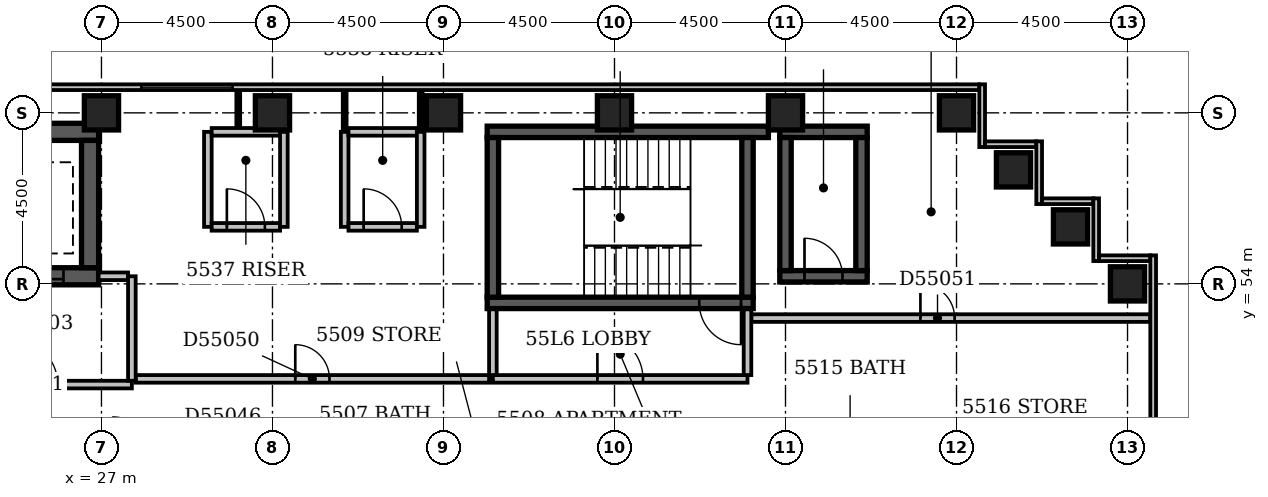
"""IFC4 building model, lengths in metres.
Left out: names, types, materials, properties, quantities, classifications, styles, units other than length and angle.
Written with IfcOpenShell. Run it as: python <this file> out.ifc"""

import sys

from ifc_helpers import new_model, si_unit, direction, frame, frame_2d, origin, origin_2d, place, context, subcontext, project, spatial, rectangle, extrude, element, fill, save


model = new_model("IFC4")
c1 = context("Model", 3, precision=1e-05, world=origin(), true_north=direction((0.0, 1.0)))
c2 = subcontext(c1, "Body", "Model", "MODEL_VIEW")
j1 = project(units=[si_unit("LENGTHUNIT", "METRE"), si_unit("PLANEANGLEUNIT", "RADIAN")], contexts=[c1])
p1 = place(None, origin())
s1 = spatial("IfcSite", under=j1, at=p1, CompositionType="ELEMENT")
p2 = place(p1, origin())
s2 = spatial("IfcBuilding", under=s1, at=p2, CompositionType="ELEMENT")
p3 = place(p2, frame((0.0, 0.0, 215.0)))
s3 = spatial("IfcBuildingStorey", under=s2, at=p3, CompositionType="ELEMENT", Elevation=215.0)
p4 = place(p3, frame((23.975, 54.2, -0.3), z_axis=(0.0, 0.0, 1.0), x_axis=(1.0, 0.0, 0.0)))
e1 = element("IfcWall", 1, at=p4, inside=s3, PredefinedType="SHEAR", context=c2, shape_type="SweptSolid", body=[
    extrude(rectangle(XDim=2.95, YDim=0.45, at=frame_2d((1.475, 0.0))), origin(), (0.0, 0.0, 1.0), 3.6),
])
p5 = place(p4, frame((0.925, 0.0, 0.3)))
e2 = element("IfcOpeningElement", 2, at=p5, cuts=e1, PredefinedType="OPENING", context=c2, shape_type="SweptSolid", body=[
    extrude(rectangle(XDim=1.1, YDim=2.1, at=frame_2d((0.55, 1.05))), frame((0.0, 0.237, 0.0), z_axis=(0.0, -1.0, 0.0), x_axis=(1.0, 0.0, 0.0)), (0.0, 0.0, 1.0), 0.474),
])
p6 = place(p3, frame((23.975, 58.0, -0.3), z_axis=(0.0, 0.0, 1.0), x_axis=(1.0, 0.0, 0.0)))
e3 = element("IfcWall", 3, at=p6, inside=s3, PredefinedType="SHEAR", context=c2, shape_type="SweptSolid", body=[
    extrude(rectangle(XDim=2.95, YDim=0.45, at=frame_2d((1.475, 0.0))), origin(), (0.0, 0.0, 1.0), 3.6),
])
p7 = place(p3, frame((26.7, 54.425, -0.3), z_axis=(0.0, 0.0, 1.0), x_axis=(0.0, 1.0, 0.0)))
e4 = element("IfcWall", 4, at=p7, inside=s3, PredefinedType="SHEAR", context=c2, shape_type="SweptSolid", body=[
    extrude(rectangle(XDim=3.35, YDim=0.45, at=frame_2d((1.675, 0.0))), origin(), (0.0, 0.0, 1.0), 3.6),
])
p8 = place(p3, frame((37.15, 53.5, -0.3), z_axis=(0.0, 0.0, 1.0), x_axis=(1.0, 0.0, 0.0)))
e5 = element("IfcWall", 5, at=p8, inside=s3, PredefinedType="SHEAR", context=c2, shape_type="SweptSolid", body=[
    extrude(rectangle(XDim=7.0, YDim=0.3, at=frame_2d((3.5, 0.0))), origin(), (0.0, 0.0, 1.0), 3.6),
])
p9 = place(p8, frame((5.58, 0.0, 0.3)))
e6 = element("IfcOpeningElement", 6, at=p9, cuts=e5, PredefinedType="OPENING", context=c2, shape_type="SweptSolid", body=[
    extrude(rectangle(XDim=1.1, YDim=2.1, at=frame_2d((0.55, 1.05))), frame((0.0, 0.162, 0.0), z_axis=(0.0, -1.0, 0.0), x_axis=(1.0, 0.0, 0.0)), (0.0, 0.0, 1.0), 0.324),
])
p10 = place(p3, frame((37.15, 58.0, -0.3), z_axis=(0.0, 0.0, 1.0), x_axis=(1.0, 0.0, 0.0)))
e7 = element("IfcWall", 7, at=p10, inside=s3, PredefinedType="SHEAR", context=c2, shape_type="SweptSolid", body=[
    extrude(rectangle(XDim=7.4, YDim=0.3, at=frame_2d((3.7, 0.0))), origin(), (0.0, 0.0, 1.0), 3.6),
])
for number, where, z_axis, x_axis in (
    (8, (37.3, 53.65, -0.3), (0.0, 0.0, 1.0), (0.0, 1.0, 0.0)),
    (9, (44.0, 53.65, -0.3), (0.0, 0.0, 1.0), (0.0, 1.0, 0.0)),
):
    element("IfcWall", number, at=place(p3, frame(where, z_axis=z_axis, x_axis=x_axis)), inside=s3, PredefinedType="SHEAR", context=c2, shape_type="SweptSolid", body=[
        extrude(rectangle(XDim=4.2, YDim=0.3, at=frame_2d((2.1, 0.0))), origin(), (0.0, 0.0, 1.0), 3.6),
    ])
p11 = place(p3, frame((44.85, 54.2, -0.3), z_axis=(0.0, 0.0, 1.0), x_axis=(1.0, 0.0, 0.0)))
e10 = element("IfcWall", 10, at=p11, inside=s3, PredefinedType="SHEAR", context=c2, shape_type="SweptSolid", body=[
    extrude(rectangle(XDim=2.3, YDim=0.3, at=frame_2d((1.15, 0.0))), origin(), (0.0, 0.0, 1.0), 3.6),
])
p12 = place(p11, frame((0.65, 0.0, 0.3)))
e11 = element("IfcOpeningElement", 11, at=p12, cuts=e10, PredefinedType="OPENING", context=c2, shape_type="SweptSolid", body=[
    extrude(rectangle(XDim=1.0, YDim=2.1, at=frame_2d((0.5, 1.05))), frame((0.0, 0.162, 0.0), z_axis=(0.0, -1.0, 0.0), x_axis=(1.0, 0.0, 0.0)), (0.0, 0.0, 1.0), 0.324),
])
p13 = place(p3, frame((44.85, 58.0, -0.3), z_axis=(0.0, 0.0, 1.0), x_axis=(1.0, 0.0, 0.0)))
e12 = element("IfcWall", 12, at=p13, inside=s3, PredefinedType="SHEAR", context=c2, shape_type="SweptSolid", body=[
    extrude(rectangle(XDim=2.3, YDim=0.3, at=frame_2d((1.15, 0.0))), origin(), (0.0, 0.0, 1.0), 3.6),
])
for number, where, z_axis, x_axis in (
    (13, (45.0, 54.35, -0.3), (0.0, 0.0, 1.0), (0.0, 1.0, 0.0)),
    (14, (47.0, 54.35, -0.3), (0.0, 0.0, 1.0), (0.0, 1.0, 0.0)),
):
    element("IfcWall", number, at=place(p3, frame(where, z_axis=z_axis, x_axis=x_axis)), inside=s3, PredefinedType="SHEAR", context=c2, shape_type="SweptSolid", body=[
        extrude(rectangle(XDim=3.5, YDim=0.3, at=frame_2d((1.75, 0.0))), origin(), (0.0, 0.0, 1.0), 3.6),
    ])
for number, where, z_axis, x_axis in (
    (15, (54.0, 54.0, -0.3), (0.0, 0.0, 1.0), (1.0, 0.0, 0.0)),
    (16, (52.5, 55.5, -0.3), (0.0, 0.0, 1.0), (1.0, 0.0, 0.0)),
    (17, (51.0, 57.0, -0.3), (0.0, 0.0, 1.0), (1.0, 0.0, 0.0)),
    (18, (27.0, 58.5, -0.3), (0.0, 0.0, 1.0), (1.0, 0.0, 0.0)),
    (19, (31.5, 58.5, -0.3), (0.0, 0.0, 1.0), (1.0, 0.0, 0.0)),
    (20, (36.0, 58.5, -0.3), (0.0, 0.0, 1.0), (1.0, 0.0, 0.0)),
    (21, (40.5, 58.5, -0.3), (0.0, 0.0, 1.0), (1.0, 0.0, 0.0)),
    (22, (45.0, 58.5, -0.3), (0.0, 0.0, 1.0), (1.0, 0.0, 0.0)),
    (23, (49.5, 58.5, -0.3), (0.0, 0.0, 1.0), (1.0, 0.0, 0.0)),
):
    element("IfcColumn", number, at=place(p3, frame(where, z_axis=z_axis, x_axis=x_axis)), inside=s3, PredefinedType="COLUMN", context=c2, shape_type="SweptSolid", body=[
        extrude(rectangle(XDim=0.9, YDim=0.9, at=origin_2d()), origin(), (0.0, 0.0, 1.0), 3.6),
    ])
p14 = place(p3, frame((54.675, 39.9, 0.0), z_axis=(0.0, 0.0, 1.0), x_axis=(0.0, 1.0, 0.0)))
e24 = element("IfcWall", 24, at=p14, inside=s3, PredefinedType="STANDARD", context=c2, shape_type="SweptSolid", body=[
    extrude(rectangle(XDim=14.85, YDim=0.15, at=frame_2d((7.425, 0.0))), origin(), (0.0, 0.0, 1.0), 2.7),
])
p15 = place(p3, frame((54.6, 54.675, 0.0), z_axis=(0.0, 0.0, 1.0), x_axis=(-1.0, 0.0, 0.0)))
e25 = element("IfcWall", 25, at=p15, inside=s3, PredefinedType="STANDARD", context=c2, shape_type="SweptSolid", body=[
    extrude(rectangle(XDim=1.35, YDim=0.15, at=frame_2d((0.675, 0.0))), origin(), (0.0, 0.0, 1.0), 2.7),
])
p16 = place(p3, frame((53.175, 54.6, 0.0), z_axis=(0.0, 0.0, 1.0), x_axis=(0.0, 1.0, 0.0)))
e26 = element("IfcWall", 26, at=p16, inside=s3, PredefinedType="STANDARD", context=c2, shape_type="SweptSolid", body=[
    extrude(rectangle(XDim=1.65, YDim=0.15, at=frame_2d((0.825, 0.0))), origin(), (0.0, 0.0, 1.0), 2.7),
])
p17 = place(p3, frame((53.1, 56.175, 0.0), z_axis=(0.0, 0.0, 1.0), x_axis=(-1.0, 0.0, 0.0)))
e27 = element("IfcWall", 27, at=p17, inside=s3, PredefinedType="STANDARD", context=c2, shape_type="SweptSolid", body=[
    extrude(rectangle(XDim=1.35, YDim=0.15, at=frame_2d((0.675, 0.0))), origin(), (0.0, 0.0, 1.0), 2.7),
])
p18 = place(p3, frame((51.675, 56.1, 0.0), z_axis=(0.0, 0.0, 1.0), x_axis=(0.0, 1.0, 0.0)))
e28 = element("IfcWall", 28, at=p18, inside=s3, PredefinedType="STANDARD", context=c2, shape_type="SweptSolid", body=[
    extrude(rectangle(XDim=1.65, YDim=0.15, at=frame_2d((0.825, 0.0))), origin(), (0.0, 0.0, 1.0), 2.7),
])
p19 = place(p3, frame((51.6, 57.675, 0.0), z_axis=(0.0, 0.0, 1.0), x_axis=(-1.0, 0.0, 0.0)))
e29 = element("IfcWall", 29, at=p19, inside=s3, PredefinedType="STANDARD", context=c2, shape_type="SweptSolid", body=[
    extrude(rectangle(XDim=1.35, YDim=0.15, at=frame_2d((0.675, 0.0))), origin(), (0.0, 0.0, 1.0), 2.7),
])
p20 = place(p3, frame((50.175, 57.6, 0.0), z_axis=(0.0, 0.0, 1.0), x_axis=(0.0, 1.0, 0.0)))
e30 = element("IfcWall", 30, at=p20, inside=s3, PredefinedType="STANDARD", context=c2, shape_type="SweptSolid", body=[
    extrude(rectangle(XDim=1.65, YDim=0.15, at=frame_2d((0.825, 0.0))), origin(), (0.0, 0.0, 1.0), 2.7),
])
p21 = place(p3, frame((50.1, 59.175, 0.0), z_axis=(0.0, 0.0, 1.0), x_axis=(-1.0, 0.0, 0.0)))
e31 = element("IfcWall", 31, at=p21, inside=s3, PredefinedType="STANDARD", context=c2, shape_type="SweptSolid", body=[
    extrude(rectangle(XDim=50.85, YDim=0.15, at=frame_2d((25.425, 0.0))), origin(), (0.0, 0.0, 1.0), 2.7),
])
p22 = place(p21, frame((19.65, 0.0, 0.6)))
e32 = element("IfcOpeningElement", 32, at=p22, cuts=e31, PredefinedType="OPENING", context=c2, shape_type="SweptSolid", body=[
    extrude(rectangle(XDim=2.4, YDim=1.8, at=frame_2d((1.2, 0.9))), frame((0.0, 0.087, 0.0), z_axis=(0.0, -1.0, 0.0), x_axis=(1.0, 0.0, 0.0)), (0.0, 0.0, 1.0), 0.174),
])
p23 = place(p3, frame((23.0, 51.35, 0.0), z_axis=(0.0, 0.0, 1.0), x_axis=(1.0, 0.0, 0.0)))
e33 = element("IfcWall", 33, at=p23, inside=s3, PredefinedType="PARTITIONING", context=c2, shape_type="SweptSolid", body=[
    extrude(rectangle(XDim=4.8, YDim=0.2, at=frame_2d((2.4, 0.0))), origin(), (0.0, 0.0, 1.0), 3.3),
])
p24 = place(p23, frame((1.65, 0.0, 0.0)))
e34 = element("IfcOpeningElement", 34, at=p24, cuts=e33, PredefinedType="OPENING", context=c2, shape_type="SweptSolid", body=[
    extrude(rectangle(XDim=1.2, YDim=2.1, at=frame_2d((0.6, 1.05))), frame((0.0, 0.112, 0.0), z_axis=(0.0, -1.0, 0.0), x_axis=(1.0, 0.0, 0.0)), (0.0, 0.0, 1.0), 0.224),
])
p25 = place(p3, frame((27.8, 51.45, 0.0), z_axis=(0.0, 0.0, 1.0), x_axis=(0.0, 1.0, 0.0)))
e35 = element("IfcWall", 35, at=p25, inside=s3, PredefinedType="PARTITIONING", context=c2, shape_type="SweptSolid", body=[
    extrude(rectangle(XDim=2.75, YDim=0.2, at=frame_2d((1.375, 0.0))), origin(), (0.0, 0.0, 1.0), 3.3),
])
p26 = place(p3, frame((26.925, 54.2, 0.0), z_axis=(0.0, 0.0, 1.0), x_axis=(1.0, 0.0, 0.0)))
e36 = element("IfcWall", 36, at=p26, inside=s3, PredefinedType="PARTITIONING", context=c2, shape_type="SweptSolid", body=[
    extrude(rectangle(XDim=0.775, YDim=0.2, at=frame_2d((0.387, 0.0))), origin(), (0.0, 0.0, 1.0), 3.3),
])
p27 = place(p3, frame((37.3, 51.5, 0.0), z_axis=(0.0, 0.0, 1.0), x_axis=(1.0, 0.0, 0.0)))
e37 = element("IfcWall", 37, at=p27, inside=s3, PredefinedType="PARTITIONING", context=c2, shape_type="SweptSolid", body=[
    extrude(rectangle(XDim=6.7, YDim=0.2, at=frame_2d((3.35, 0.0))), origin(), (0.0, 0.0, 1.0), 3.3),
])
p28 = place(p27, frame((2.75, 0.0, 0.0)))
e38 = element("IfcOpeningElement", 38, at=p28, cuts=e37, PredefinedType="OPENING", context=c2, shape_type="SweptSolid", body=[
    extrude(rectangle(XDim=1.2, YDim=2.1, at=frame_2d((0.6, 1.05))), frame((0.0, 0.112, 0.0), z_axis=(0.0, -1.0, 0.0), x_axis=(1.0, 0.0, 0.0)), (0.0, 0.0, 1.0), 0.224),
])
for number, where, z_axis, x_axis in (
    (39, (44.0, 51.6, 0.0), (0.0, 0.0, 1.0), (0.0, 1.0, 0.0)),
    (40, (37.3, 51.6, 0.0), (0.0, 0.0, 1.0), (0.0, 1.0, 0.0)),
):
    element("IfcWall", number, at=place(p3, frame(where, z_axis=z_axis, x_axis=x_axis)), inside=s3, PredefinedType="PARTITIONING", context=c2, shape_type="SweptSolid", body=[
        extrude(rectangle(XDim=1.73, YDim=0.2, at=frame_2d((0.865, 0.0))), origin(), (0.0, 0.0, 1.0), 3.3),
    ])
p29 = place(p3, frame((27.9, 51.5, 0.0), z_axis=(0.0, 0.0, 1.0), x_axis=(1.0, 0.0, 0.0)))
e41 = element("IfcWall", 41, at=p29, inside=s3, PredefinedType="PARTITIONING", context=c2, shape_type="SweptSolid", body=[
    extrude(rectangle(XDim=9.3, YDim=0.2, at=frame_2d((4.65, 0.0))), origin(), (0.0, 0.0, 1.0), 3.3),
])
p30 = place(p29, frame((4.2, 0.0, 0.0)))
e42 = element("IfcOpeningElement", 42, at=p30, cuts=e41, PredefinedType="OPENING", context=c2, shape_type="SweptSolid", body=[
    extrude(rectangle(XDim=0.9, YDim=2.1, at=frame_2d((0.45, 1.05))), frame((0.0, 0.112, 0.0), z_axis=(0.0, -1.0, 0.0), x_axis=(1.0, 0.0, 0.0)), (0.0, 0.0, 1.0), 0.224),
])
p31 = place(p3, frame((44.1, 53.1, 0.0), z_axis=(0.0, 0.0, 1.0), x_axis=(1.0, 0.0, 0.0)))
e43 = element("IfcWall", 43, at=p31, inside=s3, PredefinedType="PARTITIONING", context=c2, shape_type="SweptSolid", body=[
    extrude(rectangle(XDim=10.5, YDim=0.2, at=frame_2d((5.25, 0.0))), origin(), (0.0, 0.0, 1.0), 3.3),
])
p32 = place(p31, frame((4.45, 0.0, 0.0)))
e44 = element("IfcOpeningElement", 44, at=p32, cuts=e43, PredefinedType="OPENING", context=c2, shape_type="SweptSolid", body=[
    extrude(rectangle(XDim=0.9, YDim=2.1, at=frame_2d((0.45, 1.05))), frame((0.0, 0.112, 0.0), z_axis=(0.0, -1.0, 0.0), x_axis=(1.0, 0.0, 0.0)), (0.0, 0.0, 1.0), 0.224),
])
p33 = place(p3, frame((29.8, 55.5, 0.0), z_axis=(0.0, 0.0, 1.0), x_axis=(0.0, 1.0, 0.0)))
e45 = element("IfcWall", 45, at=p33, inside=s3, PredefinedType="PARTITIONING", context=c2, shape_type="SweptSolid", body=[
    extrude(rectangle(XDim=2.5, YDim=0.2, at=frame_2d((1.25, 0.0))), origin(), (0.0, 0.0, 1.0), 3.3),
])
p34 = place(p3, frame((29.9, 55.5, 0.0), z_axis=(0.0, 0.0, 1.0), x_axis=(1.0, 0.0, 0.0)))
e46 = element("IfcWall", 46, at=p34, inside=s3, PredefinedType="PARTITIONING", context=c2, shape_type="SweptSolid", body=[
    extrude(rectangle(XDim=1.8, YDim=0.2, at=frame_2d((0.9, 0.0))), origin(), (0.0, 0.0, 1.0), 3.3),
])
p35 = place(p34, frame((0.4, 0.0, 0.0)))
e47 = element("IfcOpeningElement", 47, at=p35, cuts=e46, PredefinedType="OPENING", context=c2, shape_type="SweptSolid", body=[
    extrude(rectangle(XDim=1.0, YDim=2.1, at=frame_2d((0.5, 1.05))), frame((0.0, 0.112, 0.0), z_axis=(0.0, -1.0, 0.0), x_axis=(1.0, 0.0, 0.0)), (0.0, 0.0, 1.0), 0.224),
])
for number, where, z_axis, x_axis in (
    (48, (31.8, 55.5, 0.0), (0.0, 0.0, 1.0), (0.0, 1.0, 0.0)),
    (49, (33.4, 55.5, 0.0), (0.0, 0.0, 1.0), (0.0, 1.0, 0.0)),
):
    element("IfcWall", number, at=place(p3, frame(where, z_axis=z_axis, x_axis=x_axis)), inside=s3, PredefinedType="PARTITIONING", context=c2, shape_type="SweptSolid", body=[
        extrude(rectangle(XDim=2.5, YDim=0.2, at=frame_2d((1.25, 0.0))), origin(), (0.0, 0.0, 1.0), 3.3),
    ])
p36 = place(p3, frame((33.5, 55.5, 0.0), z_axis=(0.0, 0.0, 1.0), x_axis=(1.0, 0.0, 0.0)))
e50 = element("IfcWall", 50, at=p36, inside=s3, PredefinedType="PARTITIONING", context=c2, shape_type="SweptSolid", body=[
    extrude(rectangle(XDim=1.8, YDim=0.2, at=frame_2d((0.9, 0.0))), origin(), (0.0, 0.0, 1.0), 3.3),
])
p37 = place(p36, frame((0.4, 0.0, 0.0)))
e51 = element("IfcOpeningElement", 51, at=p37, cuts=e50, PredefinedType="OPENING", context=c2, shape_type="SweptSolid", body=[
    extrude(rectangle(XDim=1.0, YDim=2.1, at=frame_2d((0.5, 1.05))), frame((0.0, 0.112, 0.0), z_axis=(0.0, -1.0, 0.0), x_axis=(1.0, 0.0, 0.0)), (0.0, 0.0, 1.0), 0.224),
])
p38 = place(p3, frame((35.4, 55.5, 0.0), z_axis=(0.0, 0.0, 1.0), x_axis=(0.0, 1.0, 0.0)))
e52 = element("IfcWall", 52, at=p38, inside=s3, PredefinedType="PARTITIONING", context=c2, shape_type="SweptSolid", body=[
    extrude(rectangle(XDim=2.5, YDim=0.2, at=frame_2d((1.25, 0.0))), origin(), (0.0, 0.0, 1.0), 2.4),
])
p39 = place(p3, frame((29.9, 58.0, 0.0), z_axis=(0.0, 0.0, 1.0), x_axis=(1.0, 0.0, 0.0)))
e53 = element("IfcWall", 53, at=p39, inside=s3, PredefinedType="PARTITIONING", context=c2, shape_type="SweptSolid", body=[
    extrude(rectangle(XDim=1.8, YDim=0.2, at=frame_2d((0.9, 0.0))), origin(), (0.0, 0.0, 1.0), 3.3),
])
p40 = place(p3, frame((33.4, 58.0, 0.0), z_axis=(0.0, 0.0, 1.0), x_axis=(0.0, 1.0, 0.0)))
e54 = element("IfcWall", 54, at=p40, inside=s3, PredefinedType="PARTITIONING", context=c2, shape_type="SweptSolid", body=[
    extrude(rectangle(XDim=1.1, YDim=0.1, at=frame_2d((0.55, 0.0))), origin(), (0.0, 0.0, 1.0), 3.3),
])
p41 = place(p3, frame((33.5, 58.0, 0.0), z_axis=(0.0, 0.0, 1.0), x_axis=(1.0, 0.0, 0.0)))
e55 = element("IfcWall", 55, at=p41, inside=s3, PredefinedType="PARTITIONING", context=c2, shape_type="SweptSolid", body=[
    extrude(rectangle(XDim=1.8, YDim=0.2, at=frame_2d((0.9, 0.0))), origin(), (0.0, 0.0, 1.0), 3.3),
])
p42 = place(p3, frame((35.4, 58.0, 0.0), z_axis=(0.0, 0.0, 1.0), x_axis=(0.0, 1.0, 0.0)))
e56 = element("IfcWall", 56, at=p42, inside=s3, PredefinedType="PARTITIONING", context=c2, shape_type="SweptSolid", body=[
    extrude(rectangle(XDim=1.1, YDim=0.1, at=frame_2d((0.55, 0.0))), origin(), (0.0, 0.0, 1.0), 2.4),
])
p43 = place(p3, frame((30.6, 58.1, 0.0), z_axis=(0.0, 0.0, 1.0), x_axis=(0.0, 1.0, 0.0)))
e57 = element("IfcWall", 57, at=p43, inside=s3, PredefinedType="PARTITIONING", context=c2, shape_type="SweptSolid", body=[
    extrude(rectangle(XDim=1.0, YDim=0.1, at=frame_2d((0.5, 0.0))), origin(), (0.0, 0.0, 1.0), 3.3),
])
p44 = place(p22, origin())
e58 = element("IfcWindow", 58, at=p44, inside=s3, PartitioningType="SINGLE_PANEL", PredefinedType="WINDOW", context=c2, shape_type="SweptSolid", body=[
    extrude(rectangle(XDim=2.4, YDim=1.8, at=frame_2d((1.2, 0.9))), frame((0.0, 0.03, 0.0), z_axis=(0.0, -1.0, 0.0), x_axis=(1.0, 0.0, 0.0)), (0.0, 0.0, 1.0), 0.06),
])
fill(e32, e58)
p45 = place(p24, origin())
e59 = element("IfcDoor", 59, at=p45, inside=s3, OperationType="SINGLE_SWING_LEFT", PredefinedType="DOOR", context=c2, shape_type="SweptSolid", body=[
    extrude(rectangle(XDim=1.2, YDim=2.1, at=frame_2d((0.6, 1.05))), frame((0.0, 0.025, 0.0), z_axis=(0.0, -1.0, 0.0), x_axis=(1.0, 0.0, 0.0)), (0.0, 0.0, 1.0), 0.05),
])
fill(e34, e59)
p46 = place(p5, origin())
e60 = element("IfcDoor", 60, at=p46, inside=s3, OperationType="SLIDING_TO_LEFT", PredefinedType="DOOR", context=c2, shape_type="SweptSolid", body=[
    extrude(rectangle(XDim=1.1, YDim=2.1, at=frame_2d((0.55, 1.05))), frame((0.0, 0.025, 0.0), z_axis=(0.0, -1.0, 0.0), x_axis=(1.0, 0.0, 0.0)), (0.0, 0.0, 1.0), 0.05),
])
fill(e2, e60)
p47 = place(p28, origin())
e61 = element("IfcDoor", 61, at=p47, inside=s3, OperationType="SINGLE_SWING_LEFT", PredefinedType="DOOR", context=c2, shape_type="SweptSolid", body=[
    extrude(rectangle(XDim=1.2, YDim=2.1, at=frame_2d((0.6, 1.05))), frame((0.0, 0.025, 0.0), z_axis=(0.0, -1.0, 0.0), x_axis=(1.0, 0.0, 0.0)), (0.0, 0.0, 1.0), 0.05),
])
fill(e38, e61)
p48 = place(p12, origin())
e62 = element("IfcDoor", 62, at=p48, inside=s3, OperationType="SINGLE_SWING_LEFT", PredefinedType="DOOR", context=c2, shape_type="SweptSolid", body=[
    extrude(rectangle(XDim=1.0, YDim=2.1, at=frame_2d((0.5, 1.05))), frame((0.0, 0.025, 0.0), z_axis=(0.0, -1.0, 0.0), x_axis=(1.0, 0.0, 0.0)), (0.0, 0.0, 1.0), 0.05),
])
fill(e11, e62)
p49 = place(p9, origin())
e63 = element("IfcDoor", 63, at=p49, inside=s3, OperationType="SINGLE_SWING_RIGHT", PredefinedType="DOOR", context=c2, shape_type="SweptSolid", body=[
    extrude(rectangle(XDim=1.1, YDim=2.1, at=frame_2d((0.55, 1.05))), frame((0.0, 0.025, 0.0), z_axis=(0.0, -1.0, 0.0), x_axis=(1.0, 0.0, 0.0)), (0.0, 0.0, 1.0), 0.05),
])
fill(e6, e63)
p50 = place(p30, origin())
e64 = element("IfcDoor", 64, at=p50, inside=s3, OperationType="SINGLE_SWING_LEFT", PredefinedType="DOOR", context=c2, shape_type="SweptSolid", body=[
    extrude(rectangle(XDim=0.9, YDim=2.1, at=frame_2d((0.45, 1.05))), frame((0.0, 0.025, 0.0), z_axis=(0.0, -1.0, 0.0), x_axis=(1.0, 0.0, 0.0)), (0.0, 0.0, 1.0), 0.05),
])
fill(e42, e64)
p51 = place(p32, origin())
e65 = element("IfcDoor", 65, at=p51, inside=s3, OperationType="SINGLE_SWING_LEFT", PredefinedType="DOOR", context=c2, shape_type="SweptSolid", body=[
    extrude(rectangle(XDim=0.9, YDim=2.1, at=frame_2d((0.45, 1.05))), frame((0.0, 0.025, 0.0), z_axis=(0.0, -1.0, 0.0), x_axis=(1.0, 0.0, 0.0)), (0.0, 0.0, 1.0), 0.05),
])
fill(e44, e65)
p52 = place(p35, origin())
e66 = element("IfcDoor", 66, at=p52, inside=s3, OperationType="SINGLE_SWING_LEFT", PredefinedType="DOOR", context=c2, shape_type="SweptSolid", body=[
    extrude(rectangle(XDim=1.0, YDim=2.1, at=frame_2d((0.5, 1.05))), frame((0.0, 0.025, 0.0), z_axis=(0.0, -1.0, 0.0), x_axis=(1.0, 0.0, 0.0)), (0.0, 0.0, 1.0), 0.05),
])
fill(e47, e66)
p53 = place(p37, origin())
e67 = element("IfcDoor", 67, at=p53, inside=s3, OperationType="SINGLE_SWING_LEFT", PredefinedType="DOOR", context=c2, shape_type="SweptSolid", body=[
    extrude(rectangle(XDim=1.0, YDim=2.1, at=frame_2d((0.5, 1.05))), frame((0.0, 0.025, 0.0), z_axis=(0.0, -1.0, 0.0), x_axis=(1.0, 0.0, 0.0)), (0.0, 0.0, 1.0), 0.05),
])
fill(e51, e67)
save(model, sys.argv[1])
